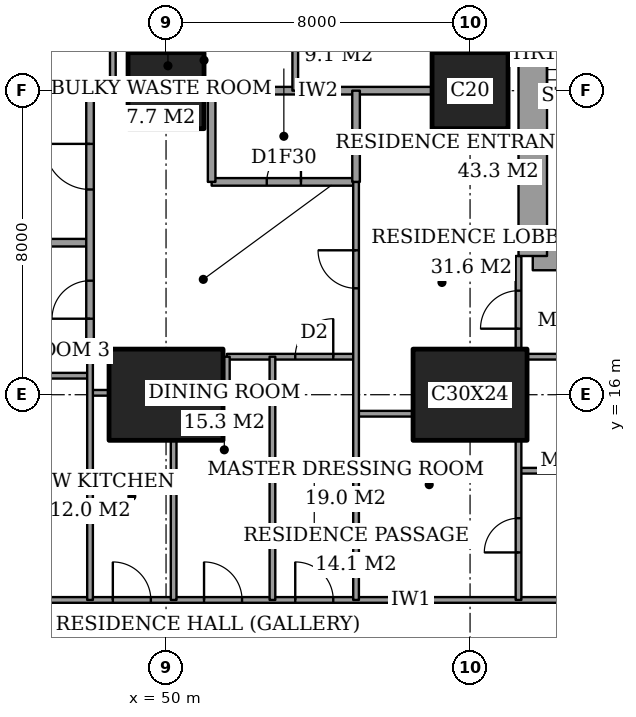
"""IFC4 building model, lengths in metres.
Left out: names, types, materials, properties, quantities, classifications, styles, units other than length and angle.
Written with IfcOpenShell. Run it as: python <this file> out.ifc"""

import sys

from ifc_helpers import new_model, si_unit, direction, frame, frame_2d, origin, origin_2d, place, context, subcontext, project, spatial, rectangle, extrude, element, fill, save


model = new_model("IFC4")
c1 = context("Model", 3, precision=1e-05, world=origin(), true_north=direction((0.0, 1.0)))
c2 = subcontext(c1, "Body", "Model", "MODEL_VIEW")
j1 = project(units=[si_unit("LENGTHUNIT", "METRE"), si_unit("PLANEANGLEUNIT", "RADIAN")], contexts=[c1])
p1 = place(None, origin())
s1 = spatial("IfcSite", under=j1, at=p1, CompositionType="ELEMENT")
p2 = place(p1, origin())
s2 = spatial("IfcBuilding", under=s1, at=p2, CompositionType="ELEMENT")
p3 = place(p2, frame((0.0, 0.0, 62.0)))
s3 = spatial("IfcBuildingStorey", under=s2, at=p3, CompositionType="ELEMENT", Elevation=62.0)
p4 = place(p3, frame((50.0, 16.0, 0.0), z_axis=(0.0, 0.0, 1.0), x_axis=(1.0, 0.0, 0.0)))
e1 = element("IfcColumn", 1, at=p4, inside=s3, PredefinedType="COLUMN", context=c2, shape_type="SweptSolid", body=[
    extrude(rectangle(XDim=3.0, YDim=2.4, at=origin_2d()), origin(), (0.0, 0.0, 1.0), 3.6),
])
p5 = place(p3, frame((50.0, 24.0, 0.0), z_axis=(0.0, 0.0, 1.0), x_axis=(1.0, 0.0, 0.0)))
e2 = element("IfcColumn", 2, at=p5, inside=s3, PredefinedType="COLUMN", context=c2, shape_type="SweptSolid", body=[
    extrude(rectangle(XDim=2.0, YDim=2.0, at=origin_2d()), origin(), (0.0, 0.0, 1.0), 3.6),
])
p6 = place(p3, frame((58.0, 16.0, 0.0), z_axis=(0.0, 0.0, 1.0), x_axis=(1.0, 0.0, 0.0)))
e3 = element("IfcColumn", 3, at=p6, inside=s3, PredefinedType="COLUMN", context=c2, shape_type="SweptSolid", body=[
    extrude(rectangle(XDim=3.0, YDim=2.4, at=origin_2d()), origin(), (0.0, 0.0, 1.0), 3.6),
])
p7 = place(p3, frame((58.0, 24.0, 0.0), z_axis=(0.0, 0.0, 1.0), x_axis=(1.0, 0.0, 0.0)))
e4 = element("IfcColumn", 4, at=p7, inside=s3, PredefinedType="COLUMN", context=c2, shape_type="SweptSolid", body=[
    extrude(rectangle(XDim=2.0, YDim=2.0, at=origin_2d()), origin(), (0.0, 0.0, 1.0), 3.6),
])
p8 = place(p3, frame((59.65, 19.65, 0.0), z_axis=(0.0, 0.0, 1.0), x_axis=(1.0, 0.0, 0.0)))
e5 = element("IfcWall", 5, at=p8, inside=s3, PredefinedType="SHEAR", context=c2, shape_type="SweptSolid", body=[
    extrude(rectangle(XDim=4.45, YDim=0.75, at=frame_2d((2.225, 0.0))), origin(), (0.0, 0.0, 1.0), 3.6),
])
p9 = place(p3, frame((59.65, 28.35, 0.0), z_axis=(0.0, 0.0, 1.0), x_axis=(0.0, -1.0, 0.0)))
e6 = element("IfcWall", 6, at=p9, inside=s3, PredefinedType="SHEAR", context=c2, shape_type="SweptSolid", body=[
    extrude(rectangle(XDim=8.7, YDim=0.75, at=frame_2d((4.35, 0.0))), origin(), (0.0, 0.0, 1.0), 3.6),
])
p10 = place(p9, frame((0.975, 0.0, 0.0)))
e7 = element("IfcOpeningElement", 7, at=p10, cuts=e6, PredefinedType="OPENING", context=c2, shape_type="SweptSolid", body=[
    extrude(rectangle(XDim=1.0, YDim=2.1, at=frame_2d((0.5, 1.05))), frame((0.0, 0.385, 0.0), z_axis=(0.0, -1.0, 0.0), x_axis=(1.0, 0.0, 0.0)), (0.0, 0.0, 1.0), 0.77),
])
p11 = place(p3, frame((41.439, 10.6, 0.0), z_axis=(0.0, 0.0, 1.0), x_axis=(1.0, 0.0, 0.0)))
e8 = element("IfcWall", 8, at=p11, inside=s3, PredefinedType="PARTITIONING", context=c2, shape_type="SweptSolid", body=[
    extrude(rectangle(XDim=25.011, YDim=0.15, at=frame_2d((12.505, 0.0))), origin(), (0.0, 0.0, 1.0), 3.35),
])
p12 = place(p11, frame((11.961, 0.0, 0.0)))
e9 = element("IfcOpeningElement", 9, at=p12, cuts=e8, PredefinedType="OPENING", context=c2, shape_type="SweptSolid", body=[
    extrude(rectangle(XDim=1.0, YDim=2.1, at=frame_2d((0.5, 1.05))), frame((0.0, 0.085, 0.0), z_axis=(0.0, -1.0, 0.0), x_axis=(1.0, 0.0, 0.0)), (0.0, 0.0, 1.0), 0.17),
])
p13 = place(p11, frame((20.924, 0.0, 0.0)))
e10 = element("IfcOpeningElement", 10, at=p13, cuts=e8, PredefinedType="OPENING", context=c2, shape_type="SweptSolid", body=[
    extrude(rectangle(XDim=1.0, YDim=2.1, at=frame_2d((0.5, 1.05))), frame((0.0, 0.085, 0.0), z_axis=(0.0, -1.0, 0.0), x_axis=(1.0, 0.0, 0.0)), (0.0, 0.0, 1.0), 0.17),
])
p14 = place(p11, frame((9.561, 0.0, 0.0)))
e11 = element("IfcOpeningElement", 11, at=p14, cuts=e8, PredefinedType="OPENING", context=c2, shape_type="SweptSolid", body=[
    extrude(rectangle(XDim=1.0, YDim=2.1, at=frame_2d((0.5, 1.05))), frame((0.0, 0.085, 0.0), z_axis=(0.0, -1.0, 0.0), x_axis=(1.0, 0.0, 0.0)), (0.0, 0.0, 1.0), 0.17),
])
p15 = place(p11, frame((7.161, 0.0, 0.0)))
e12 = element("IfcOpeningElement", 12, at=p15, cuts=e8, PredefinedType="OPENING", context=c2, shape_type="SweptSolid", body=[
    extrude(rectangle(XDim=1.0, YDim=2.1, at=frame_2d((0.5, 1.05))), frame((0.0, 0.085, 0.0), z_axis=(0.0, -1.0, 0.0), x_axis=(1.0, 0.0, 0.0)), (0.0, 0.0, 1.0), 0.17),
])
p16 = place(p11, frame((2.836, 0.0, 0.0)))
e13 = element("IfcOpeningElement", 13, at=p16, cuts=e8, PredefinedType="OPENING", context=c2, shape_type="SweptSolid", body=[
    extrude(rectangle(XDim=1.0, YDim=2.1, at=frame_2d((0.5, 1.05))), frame((0.0, 0.085, 0.0), z_axis=(0.0, -1.0, 0.0), x_axis=(1.0, 0.0, 0.0)), (0.0, 0.0, 1.0), 0.17),
])
p17 = place(p3, frame((45.6, 13.9, 0.0), z_axis=(0.0, 0.0, 1.0), x_axis=(1.0, 0.0, 0.0)))
e14 = element("IfcWall", 14, at=p17, inside=s3, PredefinedType="PARTITIONING", context=c2, shape_type="SweptSolid", body=[
    extrude(rectangle(XDim=2.4, YDim=0.15, at=frame_2d((1.2, 0.0))), origin(), (0.0, 0.0, 1.0), 3.35),
])
p18 = place(p3, frame((59.275, 14.0, 0.0), z_axis=(0.0, 0.0, 1.0), x_axis=(1.0, 0.0, 0.0)))
e15 = element("IfcWall", 15, at=p18, inside=s3, PredefinedType="PARTITIONING", context=c2, shape_type="SweptSolid", body=[
    extrude(rectangle(XDim=2.6, YDim=0.15, at=frame_2d((1.3, 0.0))), origin(), (0.0, 0.0, 1.0), 3.35),
])
p19 = place(p3, frame((55.0, 15.5, 0.0), z_axis=(0.0, 0.0, 1.0), x_axis=(1.0, 0.0, 0.0)))
e16 = element("IfcWall", 16, at=p19, inside=s3, PredefinedType="PARTITIONING", context=c2, shape_type="SweptSolid", body=[
    extrude(rectangle(XDim=1.5, YDim=0.15, at=frame_2d((0.75, 0.0))), origin(), (0.0, 0.0, 1.0), 3.35),
])
p20 = place(p3, frame((48.0, 16.05, 0.0), z_axis=(0.0, 0.0, 1.0), x_axis=(1.0, 0.0, 0.0)))
e17 = element("IfcWall", 17, at=p20, inside=s3, PredefinedType="PARTITIONING", context=c2, shape_type="SweptSolid", body=[
    extrude(rectangle(XDim=0.5, YDim=0.15, at=frame_2d((0.25, 0.0))), origin(), (0.0, 0.0, 1.0), 2.634),
])
p21 = place(p3, frame((42.0, 16.5, 0.0), z_axis=(0.0, 0.0, 1.0), x_axis=(1.0, 0.0, 0.0)))
e18 = element("IfcWall", 18, at=p21, inside=s3, PredefinedType="PARTITIONING", context=c2, shape_type="SweptSolid", body=[
    extrude(rectangle(XDim=6.0, YDim=0.15, at=frame_2d((3.0, 0.0))), origin(), (0.0, 0.0, 1.0), 3.35),
])
p22 = place(p3, frame((51.6, 17.0, 0.0), z_axis=(0.0, 0.0, 1.0), x_axis=(1.0, 0.0, 0.0)))
e19 = element("IfcWall", 19, at=p22, inside=s3, PredefinedType="PARTITIONING", context=c2, shape_type="SweptSolid", body=[
    extrude(rectangle(XDim=3.4, YDim=0.15, at=frame_2d((1.7, 0.0))), origin(), (0.0, 0.0, 1.0), 3.35),
])
p23 = place(p22, frame((1.8, 0.0, 0.0)))
e20 = element("IfcOpeningElement", 20, at=p23, cuts=e19, PredefinedType="OPENING", context=c2, shape_type="SweptSolid", body=[
    extrude(rectangle(XDim=1.0, YDim=2.1, at=frame_2d((0.5, 1.05))), frame((0.0, 0.085, 0.0), z_axis=(0.0, -1.0, 0.0), x_axis=(1.0, 0.0, 0.0)), (0.0, 0.0, 1.0), 0.17),
])
p24 = place(p3, frame((59.5, 17.0, 0.0), z_axis=(0.0, 0.0, 1.0), x_axis=(1.0, 0.0, 0.0)))
e21 = element("IfcWall", 21, at=p24, inside=s3, PredefinedType="PARTITIONING", context=c2, shape_type="SweptSolid", body=[
    extrude(rectangle(XDim=5.15, YDim=0.15, at=frame_2d((2.575, 0.0))), origin(), (0.0, 0.0, 1.0), 3.35),
])
p25 = place(p3, frame((42.0, 20.0, 0.0), z_axis=(0.0, 0.0, 1.0), x_axis=(1.0, 0.0, 0.0)))
e22 = element("IfcWall", 22, at=p25, inside=s3, PredefinedType="PARTITIONING", context=c2, shape_type="SweptSolid", body=[
    extrude(rectangle(XDim=6.0, YDim=0.2, at=frame_2d((3.0, 0.0))), origin(), (0.0, 0.0, 1.0), 3.35),
])
p26 = place(p3, frame((51.2, 21.6, 0.0), z_axis=(0.0, 0.0, 1.0), x_axis=(1.0, 0.0, 0.0)))
e23 = element("IfcWall", 23, at=p26, inside=s3, PredefinedType="PARTITIONING", context=c2, shape_type="SweptSolid", body=[
    extrude(rectangle(XDim=3.8, YDim=0.2, at=frame_2d((1.9, 0.0))), origin(), (0.0, 0.0, 1.0), 3.35),
])
p27 = place(p26, frame((1.45, 0.0, 0.0)))
e24 = element("IfcOpeningElement", 24, at=p27, cuts=e23, PredefinedType="OPENING", context=c2, shape_type="SweptSolid", body=[
    extrude(rectangle(XDim=0.9, YDim=2.1, at=frame_2d((0.45, 1.05))), frame((0.0, 0.11, 0.0), z_axis=(0.0, -1.0, 0.0), x_axis=(1.0, 0.0, 0.0)), (0.0, 0.0, 1.0), 0.22),
])
p28 = place(p3, frame((48.0, 24.0, 0.0), z_axis=(0.0, 0.0, 1.0), x_axis=(1.0, 0.0, 0.0)))
e25 = element("IfcWall", 25, at=p28, inside=s3, PredefinedType="PARTITIONING", context=c2, shape_type="SweptSolid", body=[
    extrude(rectangle(XDim=1.0, YDim=0.2, at=frame_2d((0.5, 0.0))), origin(), (0.0, 0.0, 1.0), 3.35),
])
p29 = place(p3, frame((51.0, 24.0, 0.0), z_axis=(0.0, 0.0, 1.0), x_axis=(1.0, 0.0, 0.0)))
e26 = element("IfcWall", 26, at=p29, inside=s3, PredefinedType="PARTITIONING", context=c2, shape_type="SweptSolid", body=[
    extrude(rectangle(XDim=6.0, YDim=0.2, at=frame_2d((3.0, 0.0))), origin(), (0.0, 0.0, 1.0), 3.35),
])
p30 = place(p3, frame((48.0, 17.0, 0.0), z_axis=(0.0, 0.0, 1.0), x_axis=(0.0, 1.0, 0.0)))
e27 = element("IfcWall", 27, at=p30, inside=s3, PredefinedType="PARTITIONING", context=c2, shape_type="SweptSolid", body=[
    extrude(rectangle(XDim=7.0, YDim=0.2, at=frame_2d((3.5, 0.0))), origin(), (0.0, 0.0, 1.0), 3.35),
])
p31 = place(p30, frame((4.4, 0.0, 0.0)))
e28 = element("IfcOpeningElement", 28, at=p31, cuts=e27, PredefinedType="OPENING", context=c2, shape_type="SweptSolid", body=[
    extrude(rectangle(XDim=1.2, YDim=2.4, at=frame_2d((0.6, 1.2))), frame((0.0, 0.11, 0.0), z_axis=(0.0, -1.0, 0.0), x_axis=(1.0, 0.0, 0.0)), (0.0, 0.0, 1.0), 0.22),
])
p32 = place(p30, frame((1.0, 0.0, 0.0)))
e29 = element("IfcOpeningElement", 29, at=p32, cuts=e27, PredefinedType="OPENING", context=c2, shape_type="SweptSolid", body=[
    extrude(rectangle(XDim=1.0, YDim=2.1, at=frame_2d((0.5, 1.05))), frame((0.0, 0.11, 0.0), z_axis=(0.0, -1.0, 0.0), x_axis=(1.0, 0.0, 0.0)), (0.0, 0.0, 1.0), 0.22),
])
p33 = place(p3, frame((48.0, 10.6, 0.0), z_axis=(0.0, 0.0, 1.0), x_axis=(0.0, 1.0, 0.0)))
e30 = element("IfcWall", 30, at=p33, inside=s3, PredefinedType="PARTITIONING", context=c2, shape_type="SweptSolid", body=[
    extrude(rectangle(XDim=6.4, YDim=0.15, at=frame_2d((3.2, 0.0))), origin(), (0.0, 0.0, 1.0), 3.35),
])
p34 = place(p3, frame((48.6, 24.0, 0.0), z_axis=(0.0, 0.0, 1.0), x_axis=(0.0, 1.0, 0.0)))
e31 = element("IfcWall", 31, at=p34, inside=s3, PredefinedType="PARTITIONING", context=c2, shape_type="SweptSolid", body=[
    extrude(rectangle(XDim=1.6, YDim=0.15, at=frame_2d((0.8, 0.0))), origin(), (0.0, 0.0, 1.0), 3.35),
])
p35 = place(p3, frame((50.2, 10.6, 0.0), z_axis=(0.0, 0.0, 1.0), x_axis=(0.0, 1.0, 0.0)))
e32 = element("IfcWall", 32, at=p35, inside=s3, PredefinedType="PARTITIONING", context=c2, shape_type="SweptSolid", body=[
    extrude(rectangle(XDim=4.2, YDim=0.15, at=frame_2d((2.1, 0.0))), origin(), (0.0, 0.0, 1.0), 3.35),
])
p36 = place(p3, frame((51.2, 21.6, 0.0), z_axis=(0.0, 0.0, 1.0), x_axis=(0.0, 1.0, 0.0)))
e33 = element("IfcWall", 33, at=p36, inside=s3, PredefinedType="PARTITIONING", context=c2, shape_type="SweptSolid", body=[
    extrude(rectangle(XDim=2.4, YDim=0.2, at=frame_2d((1.2, 0.0))), origin(), (0.0, 0.0, 1.0), 3.35),
])
p37 = place(p3, frame((51.6, 16.05, 0.0), z_axis=(0.0, 0.0, 1.0), x_axis=(0.0, 1.0, 0.0)))
e34 = element("IfcWall", 34, at=p37, inside=s3, PredefinedType="PARTITIONING", context=c2, shape_type="SweptSolid", body=[
    extrude(rectangle(XDim=0.95, YDim=0.15, at=frame_2d((0.475, 0.0))), origin(), (0.0, 0.0, 1.0), 3.35),
])
p38 = place(p3, frame((52.8, 10.6, 0.0), z_axis=(0.0, 0.0, 1.0), x_axis=(0.0, 1.0, 0.0)))
e35 = element("IfcWall", 35, at=p38, inside=s3, PredefinedType="PARTITIONING", context=c2, shape_type="SweptSolid", body=[
    extrude(rectangle(XDim=6.4, YDim=0.15, at=frame_2d((3.2, 0.0))), origin(), (0.0, 0.0, 1.0), 3.35),
])
p39 = place(p3, frame((53.4, 24.0, 0.0), z_axis=(0.0, 0.0, 1.0), x_axis=(0.0, 1.0, 0.0)))
e36 = element("IfcWall", 36, at=p39, inside=s3, PredefinedType="PARTITIONING", context=c2, shape_type="SweptSolid", body=[
    extrude(rectangle(XDim=1.6, YDim=0.15, at=frame_2d((0.8, 0.0))), origin(), (0.0, 0.0, 1.0), 3.35),
])
p40 = place(p3, frame((55.0, 21.6, 0.0), z_axis=(0.0, 0.0, 1.0), x_axis=(0.0, 1.0, 0.0)))
e37 = element("IfcWall", 37, at=p40, inside=s3, PredefinedType="PARTITIONING", context=c2, shape_type="SweptSolid", body=[
    extrude(rectangle(XDim=2.4, YDim=0.2, at=frame_2d((1.2, 0.0))), origin(), (0.0, 0.0, 1.0), 3.35),
])
p41 = place(p3, frame((55.0, 10.6, 0.0), z_axis=(0.0, 0.0, 1.0), x_axis=(0.0, 1.0, 0.0)))
e38 = element("IfcWall", 38, at=p41, inside=s3, PredefinedType="PARTITIONING", context=c2, shape_type="SweptSolid", body=[
    extrude(rectangle(XDim=11.0, YDim=0.15, at=frame_2d((5.5, 0.0))), origin(), (0.0, 0.0, 1.0), 3.35),
])
p42 = place(p41, frame((8.2, 0.0, 0.0)))
e39 = element("IfcOpeningElement", 39, at=p42, cuts=e38, PredefinedType="OPENING", context=c2, shape_type="SweptSolid", body=[
    extrude(rectangle(XDim=1.0, YDim=2.1, at=frame_2d((0.5, 1.05))), frame((0.0, 0.085, 0.0), z_axis=(0.0, -1.0, 0.0), x_axis=(1.0, 0.0, 0.0)), (0.0, 0.0, 1.0), 0.17),
])
p43 = place(p3, frame((59.275, 10.6, 0.0), z_axis=(0.0, 0.0, 1.0), x_axis=(0.0, 1.0, 0.0)))
e40 = element("IfcWall", 40, at=p43, inside=s3, PredefinedType="PARTITIONING", context=c2, shape_type="SweptSolid", body=[
    extrude(rectangle(XDim=4.2, YDim=0.15, at=frame_2d((2.1, 0.0))), origin(), (0.0, 0.0, 1.0), 3.35),
])
p44 = place(p43, frame((1.25, 0.0, 0.0)))
e41 = element("IfcOpeningElement", 41, at=p44, cuts=e40, PredefinedType="OPENING", context=c2, shape_type="SweptSolid", body=[
    extrude(rectangle(XDim=0.9, YDim=2.1, at=frame_2d((0.45, 1.05))), frame((0.0, 0.085, 0.0), z_axis=(0.0, -1.0, 0.0), x_axis=(1.0, 0.0, 0.0)), (0.0, 0.0, 1.0), 0.17),
])
p45 = place(p3, frame((59.275, 17.2, 0.0), z_axis=(0.0, 0.0, 1.0), x_axis=(0.0, 1.0, 0.0)))
e42 = element("IfcWall", 42, at=p45, inside=s3, PredefinedType="PARTITIONING", context=c2, shape_type="SweptSolid", body=[
    extrude(rectangle(XDim=2.45, YDim=0.15, at=frame_2d((1.225, 0.0))), origin(), (0.0, 0.0, 1.0), 3.35),
])
p46 = place(p45, frame((0.538, 0.0, 0.0)))
e43 = element("IfcOpeningElement", 43, at=p46, cuts=e42, PredefinedType="OPENING", context=c2, shape_type="SweptSolid", body=[
    extrude(rectangle(XDim=1.0, YDim=2.1, at=frame_2d((0.5, 1.05))), frame((0.0, 0.085, 0.0), z_axis=(0.0, -1.0, 0.0), x_axis=(1.0, 0.0, 0.0)), (0.0, 0.0, 1.0), 0.17),
])
p47 = place(p12, origin())
e44 = element("IfcDoor", 44, at=p47, inside=s3, OperationType="SINGLE_SWING_RIGHT", PredefinedType="DOOR", context=c2, shape_type="SweptSolid", body=[
    extrude(rectangle(XDim=1.0, YDim=2.1, at=frame_2d((0.5, 1.05))), frame((0.0, 0.025, 0.0), z_axis=(0.0, -1.0, 0.0), x_axis=(1.0, 0.0, 0.0)), (0.0, 0.0, 1.0), 0.05),
])
fill(e9, e44)
p48 = place(p46, origin())
e45 = element("IfcDoor", 45, at=p48, inside=s3, OperationType="SINGLE_SWING_RIGHT", PredefinedType="DOOR", context=c2, shape_type="SweptSolid", body=[
    extrude(rectangle(XDim=1.0, YDim=2.1, at=frame_2d((0.5, 1.05))), frame((0.0, 0.025, 0.0), z_axis=(0.0, -1.0, 0.0), x_axis=(1.0, 0.0, 0.0)), (0.0, 0.0, 1.0), 0.05),
])
fill(e43, e45)
p49 = place(p44, origin())
e46 = element("IfcDoor", 46, at=p49, inside=s3, OperationType="SINGLE_SWING_RIGHT", PredefinedType="DOOR", context=c2, shape_type="SweptSolid", body=[
    extrude(rectangle(XDim=0.9, YDim=2.1, at=frame_2d((0.45, 1.05))), frame((0.0, 0.025, 0.0), z_axis=(0.0, -1.0, 0.0), x_axis=(1.0, 0.0, 0.0)), (0.0, 0.0, 1.0), 0.05),
])
fill(e41, e46)
p50 = place(p42, origin())
e47 = element("IfcDoor", 47, at=p50, inside=s3, OperationType="SINGLE_SWING_LEFT", PredefinedType="DOOR", context=c2, shape_type="SweptSolid", body=[
    extrude(rectangle(XDim=1.0, YDim=2.1, at=frame_2d((0.5, 1.05))), frame((0.0, 0.025, 0.0), z_axis=(0.0, -1.0, 0.0), x_axis=(1.0, 0.0, 0.0)), (0.0, 0.0, 1.0), 0.05),
])
fill(e39, e47)
p51 = place(p27, origin())
e48 = element("IfcDoor", 48, at=p51, inside=s3, OperationType="SINGLE_SWING_LEFT", PredefinedType="DOOR", context=c2, shape_type="SweptSolid", body=[
    extrude(rectangle(XDim=0.9, YDim=2.1, at=frame_2d((0.45, 1.05))), frame((0.0, 0.025, 0.0), z_axis=(0.0, -1.0, 0.0), x_axis=(1.0, 0.0, 0.0)), (0.0, 0.0, 1.0), 0.05),
])
fill(e24, e48)
p52 = place(p31, origin())
e49 = element("IfcDoor", 49, at=p52, inside=s3, OperationType="SINGLE_SWING_LEFT", PredefinedType="DOOR", context=c2, shape_type="SweptSolid", body=[
    extrude(rectangle(XDim=1.2, YDim=2.4, at=frame_2d((0.6, 1.2))), frame((0.0, 0.025, 0.0), z_axis=(0.0, -1.0, 0.0), x_axis=(1.0, 0.0, 0.0)), (0.0, 0.0, 1.0), 0.05),
])
fill(e28, e49)
p53 = place(p23, origin())
e50 = element("IfcDoor", 50, at=p53, inside=s3, OperationType="SINGLE_SWING_LEFT", PredefinedType="DOOR", context=c2, shape_type="SweptSolid", body=[
    extrude(rectangle(XDim=1.0, YDim=2.1, at=frame_2d((0.5, 1.05))), frame((0.0, 0.025, 0.0), z_axis=(0.0, -1.0, 0.0), x_axis=(1.0, 0.0, 0.0)), (0.0, 0.0, 1.0), 0.05),
])
fill(e20, e50)
p54 = place(p14, origin())
e51 = element("IfcDoor", 51, at=p54, inside=s3, OperationType="SINGLE_SWING_RIGHT", PredefinedType="DOOR", context=c2, shape_type="SweptSolid", body=[
    extrude(rectangle(XDim=1.0, YDim=2.1, at=frame_2d((0.5, 1.05))), frame((0.0, 0.025, 0.0), z_axis=(0.0, -1.0, 0.0), x_axis=(1.0, 0.0, 0.0)), (0.0, 0.0, 1.0), 0.05),
])
fill(e11, e51)
p55 = place(p15, origin())
e52 = element("IfcDoor", 52, at=p55, inside=s3, OperationType="SINGLE_SWING_RIGHT", PredefinedType="DOOR", context=c2, shape_type="SweptSolid", body=[
    extrude(rectangle(XDim=1.0, YDim=2.1, at=frame_2d((0.5, 1.05))), frame((0.0, 0.025, 0.0), z_axis=(0.0, -1.0, 0.0), x_axis=(1.0, 0.0, 0.0)), (0.0, 0.0, 1.0), 0.05),
])
fill(e12, e52)
p56 = place(p32, origin())
e53 = element("IfcDoor", 53, at=p56, inside=s3, OperationType="SINGLE_SWING_RIGHT", PredefinedType="DOOR", context=c2, shape_type="SweptSolid", body=[
    extrude(rectangle(XDim=1.0, YDim=2.1, at=frame_2d((0.5, 1.05))), frame((0.0, 0.025, 0.0), z_axis=(0.0, -1.0, 0.0), x_axis=(1.0, 0.0, 0.0)), (0.0, 0.0, 1.0), 0.05),
])
fill(e29, e53)
save(model, sys.argv[1])
